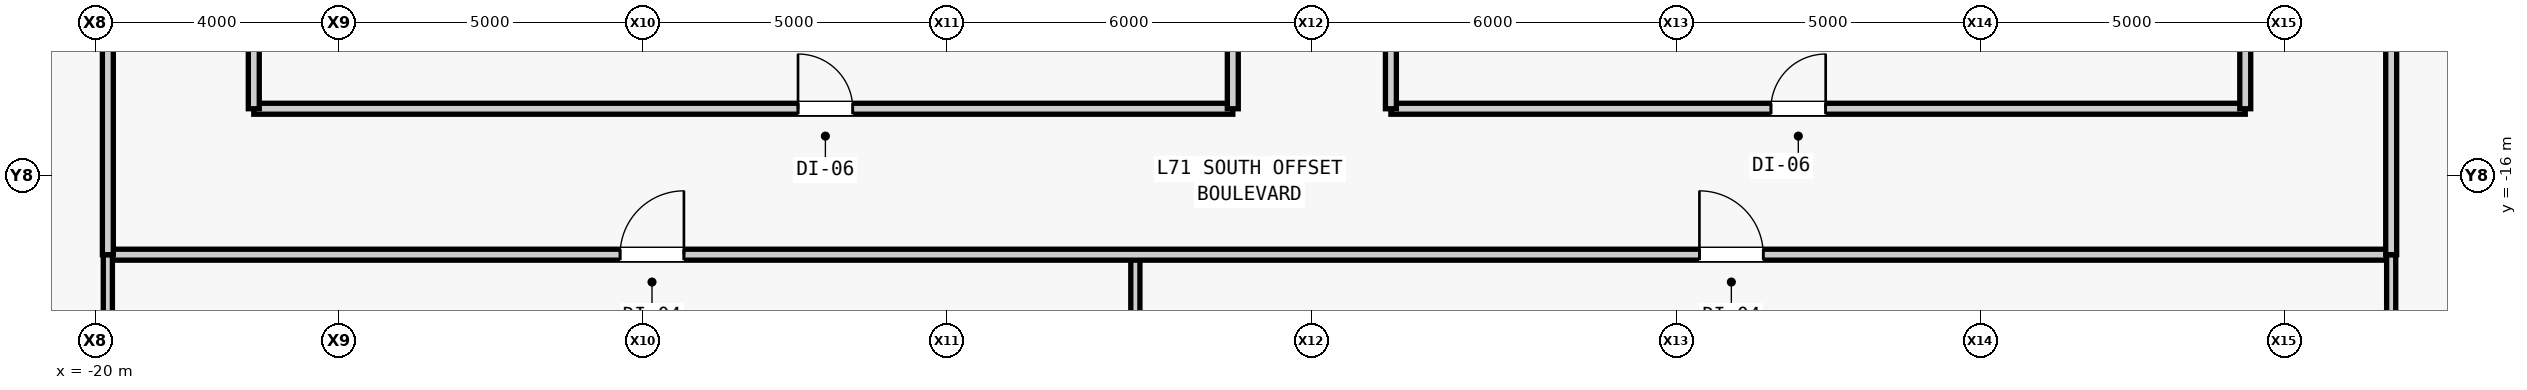
"""IFC4 building model, lengths in metres.
Left out: names, types, materials, properties, quantities, classifications, styles, units other than length and angle.
Written with IfcOpenShell. Run it as: python <this file> out.ifc"""

import sys

from ifc_helpers import new_model, si_unit, direction, frame, frame_2d, origin, place, context, subcontext, project, spatial, rectangle, extrude, source, transform, mapped, element, fill, save


model = new_model("IFC4")
c1 = context("Model", 3, precision=1e-05, world=origin(), true_north=direction((0.0, 1.0)))
c2 = subcontext(c1, "Body", "Model", "MODEL_VIEW")
j1 = project(units=[si_unit("LENGTHUNIT", "METRE"), si_unit("PLANEANGLEUNIT", "RADIAN")], contexts=[c1])
p1 = place(None, origin())
s1 = spatial("IfcSite", under=j1, at=p1, CompositionType="ELEMENT")
p2 = place(p1, origin())
s2 = spatial("IfcBuilding", under=s1, at=p2, CompositionType="ELEMENT")
p3 = place(p2, frame((0.0, 0.0, 301.5)))
s3 = spatial("IfcBuildingStorey", under=s2, at=p3, CompositionType="ELEMENT", Elevation=301.5)
m1 = source(origin(), c2, "Body", "SweptSolid", [
    extrude(rectangle(XDim=16.1, YDim=0.18, at=frame_2d((8.05, 0.0))), origin(), (0.0, 0.0, 1.0), 3.78),
])
p4 = place(p3, frame((-17.4, -14.9, 0.0), z_axis=(0.0, 0.0, 1.0), x_axis=(1.0, 0.0, 0.0)))
e1 = element("IfcWall", 1, at=p4, inside=s3, PredefinedType="PARTITIONING", context=c2, shape_type="MappedRepresentation", body=[
    mapped(m1, transform((0.0, 0.0, 0.0), scale=1.0)),
])
m2 = source(origin(), c2, "Body", "SweptSolid", [
    extrude(rectangle(XDim=0.9, YDim=2.15, at=frame_2d((0.45, 1.075))), frame((0.0, 0.1, 0.0), z_axis=(0.0, -1.0, 0.0), x_axis=(1.0, 0.0, 0.0)), (0.0, 0.0, 1.0), 0.2),
])
p5 = place(p4, frame((8.95, 0.0, 0.0)))
e2 = element("IfcOpeningElement", 2, at=p5, cuts=e1, PredefinedType="OPENING", context=c2, shape_type="MappedRepresentation", body=[
    mapped(m2, transform((0.0, 0.0, 0.0), scale=1.0)),
])
m3 = source(origin(), c2, "Body", "SweptSolid", [
    extrude(rectangle(XDim=5.1, YDim=0.18, at=frame_2d((2.55, 0.0))), origin(), (0.0, 0.0, 1.0), 3.78),
])
p6 = place(p3, frame((-17.4, -14.9, 0.0), z_axis=(0.0, 0.0, 1.0), x_axis=(0.0, 1.0, 0.0)))
e3 = element("IfcWall", 3, at=p6, inside=s3, PredefinedType="PARTITIONING", context=c2, shape_type="MappedRepresentation", body=[
    mapped(m3, transform((0.0, 0.0, 0.0), scale=1.0)),
])
m4 = source(origin(), c2, "Body", "SweptSolid", [
    extrude(rectangle(XDim=3.9, YDim=0.18, at=frame_2d((1.95, 0.0))), origin(), (0.0, 0.0, 1.0), 3.78),
])
p7 = place(p3, frame((-1.3, -14.9, 0.0), z_axis=(0.0, 0.0, 1.0), x_axis=(0.0, 1.0, 0.0)))
e4 = element("IfcWall", 4, at=p7, inside=s3, PredefinedType="PARTITIONING", context=c2, shape_type="MappedRepresentation", body=[
    mapped(m4, transform((0.0, 0.0, 0.0), scale=1.0)),
])
m5 = source(origin(), c2, "Body", "SweptSolid", [
    extrude(rectangle(XDim=14.05, YDim=0.18, at=frame_2d((7.025, 0.0))), origin(), (0.0, 0.0, 1.0), 3.78),
])
p8 = place(p3, frame((1.3, -14.9, 0.0), z_axis=(0.0, 0.0, 1.0), x_axis=(1.0, 0.0, 0.0)))
e5 = element("IfcWall", 5, at=p8, inside=s3, PredefinedType="PARTITIONING", context=c2, shape_type="MappedRepresentation", body=[
    mapped(m5, transform((0.0, 0.0, 0.0), scale=1.0)),
])
p9 = place(p8, frame((6.25, 0.0, 0.0)))
e6 = element("IfcOpeningElement", 6, at=p9, cuts=e5, PredefinedType="OPENING", context=c2, shape_type="MappedRepresentation", body=[
    mapped(m2, transform((0.0, 0.0, 0.0), scale=1.0)),
])
p10 = place(p3, frame((1.3, -14.9, 0.0), z_axis=(0.0, 0.0, 1.0), x_axis=(0.0, 1.0, 0.0)))
e7 = element("IfcWall", 7, at=p10, inside=s3, PredefinedType="PARTITIONING", context=c2, shape_type="MappedRepresentation", body=[
    mapped(m4, transform((0.0, 0.0, 0.0), scale=1.0)),
])
m6 = source(origin(), c2, "Body", "SweptSolid", [
    extrude(rectangle(XDim=4.4, YDim=0.18, at=frame_2d((2.2, 0.0))), origin(), (0.0, 0.0, 1.0), 3.78),
])
p11 = place(p3, frame((15.35, -14.9, 0.0), z_axis=(0.0, 0.0, 1.0), x_axis=(0.0, 1.0, 0.0)))
e8 = element("IfcWall", 8, at=p11, inside=s3, PredefinedType="PARTITIONING", context=c2, shape_type="MappedRepresentation", body=[
    mapped(m6, transform((0.0, 0.0, 0.0), scale=1.0)),
])
m7 = source(origin(), c2, "Body", "SweptSolid", [
    extrude(rectangle(XDim=10.7, YDim=0.15, at=frame_2d((5.35, 0.0))), origin(), (0.0, 0.0, 1.0), 3.78),
])
p12 = place(p3, frame((-2.903, -28.0, 0.0), z_axis=(0.0, 0.0, 1.0), x_axis=(0.0, 1.0, 0.0)))
e9 = element("IfcWall", 9, at=p12, inside=s3, PredefinedType="PARTITIONING", context=c2, shape_type="MappedRepresentation", body=[
    mapped(m7, transform((0.0, 0.0, 0.0), scale=1.0)),
])
m8 = source(origin(), c2, "Body", "SweptSolid", [
    extrude(rectangle(XDim=37.55, YDim=0.18, at=frame_2d((18.775, 0.0))), origin(), (0.0, 0.0, 1.0), 3.78),
])
p13 = place(p3, frame((-19.8, -17.3, 0.0), z_axis=(0.0, 0.0, 1.0), x_axis=(1.0, 0.0, 0.0)))
e10 = element("IfcWall", 10, at=p13, inside=s3, PredefinedType="PARTITIONING", context=c2, shape_type="MappedRepresentation", body=[
    mapped(m8, transform((0.0, 0.0, 0.0), scale=1.0)),
])
m9 = source(origin(), c2, "Body", "SweptSolid", [
    extrude(rectangle(XDim=1.05, YDim=2.2, at=frame_2d((0.525, 1.1))), frame((0.0, 0.1, 0.0), z_axis=(0.0, -1.0, 0.0), x_axis=(1.0, 0.0, 0.0)), (0.0, 0.0, 1.0), 0.2),
])
p14 = place(p13, frame((8.424, 0.0, 0.0)))
e11 = element("IfcOpeningElement", 11, at=p14, cuts=e10, PredefinedType="OPENING", context=c2, shape_type="MappedRepresentation", body=[
    mapped(m9, transform((0.0, 0.0, 0.0), scale=1.0)),
])
p15 = place(p13, frame((26.174, 0.0, 0.0)))
e12 = element("IfcOpeningElement", 12, at=p15, cuts=e10, PredefinedType="OPENING", context=c2, shape_type="MappedRepresentation", body=[
    mapped(m9, transform((0.0, 0.0, 0.0), scale=1.0)),
])
m10 = source(origin(), c2, "Body", "SweptSolid", [
    extrude(rectangle(XDim=10.7, YDim=0.15, at=frame_2d((5.35, 0.0))), origin(), (0.0, 0.0, 1.0), 3.164),
])
p16 = place(p3, frame((-19.8, -28.0, 0.0), z_axis=(0.0, 0.0, 1.0), x_axis=(0.0, 1.0, 0.0)))
e13 = element("IfcWall", 13, at=p16, inside=s3, PredefinedType="PARTITIONING", context=c2, shape_type="MappedRepresentation", body=[
    mapped(m10, transform((0.0, 0.0, 0.0), scale=1.0)),
])
p17 = place(p3, frame((17.75, -28.0, 0.0), z_axis=(0.0, 0.0, 1.0), x_axis=(0.0, 1.0, 0.0)))
e14 = element("IfcWall", 14, at=p17, inside=s3, PredefinedType="PARTITIONING", context=c2, shape_type="MappedRepresentation", body=[
    mapped(m7, transform((0.0, 0.0, 0.0), scale=1.0)),
])
m11 = source(origin(), c2, "Body", "SweptSolid", [
    extrude(rectangle(XDim=39.8, YDim=0.18, at=frame_2d((19.9, 0.0))), origin(), (0.0, 0.0, 1.0), 3.164),
])
p18 = place(p3, frame((-19.8, -17.3, 0.0), z_axis=(0.0, 0.0, 1.0), x_axis=(0.0, 1.0, 0.0)))
e15 = element("IfcWall", 15, at=p18, inside=s3, PredefinedType="PARTITIONING", context=c2, shape_type="MappedRepresentation", body=[
    mapped(m11, transform((0.0, 0.0, 0.0), scale=1.0)),
])
m12 = source(origin(), c2, "Body", "SweptSolid", [
    extrude(rectangle(XDim=0.95, YDim=2.15, at=frame_2d((0.475, 1.075))), frame((0.0, 0.1, 0.0), z_axis=(0.0, -1.0, 0.0), x_axis=(1.0, 0.0, 0.0)), (0.0, 0.0, 1.0), 0.2),
])
p19 = place(p18, frame((9.545, 0.0, 0.0)))
e16 = element("IfcOpeningElement", 16, at=p19, cuts=e15, PredefinedType="OPENING", context=c2, shape_type="MappedRepresentation", body=[
    mapped(m12, transform((0.0, 0.0, 0.0), scale=1.0)),
])
p20 = place(p18, frame((24.195, 0.0, 0.0)))
e17 = element("IfcOpeningElement", 17, at=p20, cuts=e15, PredefinedType="OPENING", context=c2, shape_type="MappedRepresentation", body=[
    mapped(m12, transform((0.0, 0.0, 0.0), scale=1.0)),
])
m13 = source(origin(), c2, "Body", "SweptSolid", [
    extrude(rectangle(XDim=39.8, YDim=0.18, at=frame_2d((19.9, 0.0))), origin(), (0.0, 0.0, 1.0), 3.78),
])
p21 = place(p3, frame((17.75, -17.3, 0.0), z_axis=(0.0, 0.0, 1.0), x_axis=(0.0, 1.0, 0.0)))
e18 = element("IfcWall", 18, at=p21, inside=s3, PredefinedType="PARTITIONING", context=c2, shape_type="MappedRepresentation", body=[
    mapped(m13, transform((0.0, 0.0, 0.0), scale=1.0)),
])
p22 = place(p21, frame((6.5, 0.0, 0.0)))
e19 = element("IfcOpeningElement", 19, at=p22, cuts=e18, PredefinedType="OPENING", context=c2, shape_type="MappedRepresentation", body=[
    mapped(m12, transform((0.0, 0.0, 0.0), scale=1.0)),
])
p23 = place(p21, frame((15.32, 0.0, 0.0)))
e20 = element("IfcOpeningElement", 20, at=p23, cuts=e18, PredefinedType="OPENING", context=c2, shape_type="MappedRepresentation", body=[
    mapped(m12, transform((0.0, 0.0, 0.0), scale=1.0)),
])
p24 = place(p21, frame((24.995, 0.0, 0.0)))
e21 = element("IfcOpeningElement", 21, at=p24, cuts=e18, PredefinedType="OPENING", context=c2, shape_type="MappedRepresentation", body=[
    mapped(m12, transform((0.0, 0.0, 0.0), scale=1.0)),
])
m14 = source(origin(), c2, "Body", "SweptSolid", [
    extrude(rectangle(XDim=0.9, YDim=2.15, at=frame_2d((0.45, 1.075))), frame((0.0, 0.025, 0.0), z_axis=(0.0, -1.0, 0.0), x_axis=(1.0, 0.0, 0.0)), (0.0, 0.0, 1.0), 0.05),
])
p25 = place(p5, origin())
e22 = element("IfcDoor", 22, at=p25, inside=s3, OperationType="SINGLE_SWING_LEFT", PredefinedType="DOOR", context=c2, shape_type="MappedRepresentation", body=[
    mapped(m14, transform((0.0, 0.0, 0.0), scale=1.0)),
])
fill(e2, e22)
p26 = place(p9, origin())
e23 = element("IfcDoor", 23, at=p26, inside=s3, OperationType="SINGLE_SWING_RIGHT", PredefinedType="DOOR", context=c2, shape_type="MappedRepresentation", body=[
    mapped(m14, transform((0.0, 0.0, 0.0), scale=1.0)),
])
fill(e6, e23)
m15 = source(origin(), c2, "Body", "SweptSolid", [
    extrude(rectangle(XDim=1.05, YDim=2.2, at=frame_2d((0.525, 1.1))), frame((0.0, 0.025, 0.0), z_axis=(0.0, -1.0, 0.0), x_axis=(1.0, 0.0, 0.0)), (0.0, 0.0, 1.0), 0.05),
])
p27 = place(p14, origin())
e24 = element("IfcDoor", 24, at=p27, inside=s3, OperationType="SINGLE_SWING_RIGHT", PredefinedType="DOOR", context=c2, shape_type="MappedRepresentation", body=[
    mapped(m15, transform((0.0, 0.0, 0.0), scale=1.0)),
])
fill(e11, e24)
p28 = place(p15, origin())
e25 = element("IfcDoor", 25, at=p28, inside=s3, OperationType="SINGLE_SWING_LEFT", PredefinedType="DOOR", context=c2, shape_type="MappedRepresentation", body=[
    mapped(m15, transform((0.0, 0.0, 0.0), scale=1.0)),
])
fill(e12, e25)
save(model, sys.argv[1])
